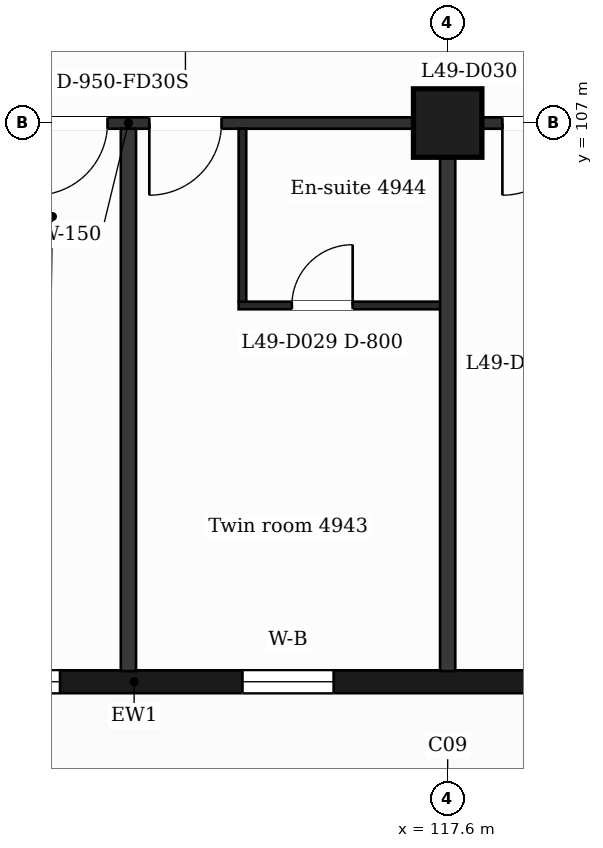
"""IFC4 building model, lengths in metres.
Left out: names, types, materials, properties, quantities, classifications, styles, units other than length and angle.
Written with IfcOpenShell. Run it as: python <this file> out.ifc"""

import sys

from ifc_helpers import new_model, si_unit, direction, frame, frame_2d, origin, origin_2d, place, context, subcontext, project, spatial, rectangle, extrude, element, fill, save


model = new_model("IFC4")
c1 = context("Model", 3, precision=1e-05, world=origin(), true_north=direction((0.0, 1.0)))
c2 = subcontext(c1, "Body", "Model", "MODEL_VIEW")
j1 = project(units=[si_unit("LENGTHUNIT", "METRE"), si_unit("PLANEANGLEUNIT", "RADIAN")], contexts=[c1])
p1 = place(None, origin())
s1 = spatial("IfcSite", under=j1, at=p1, CompositionType="ELEMENT")
p2 = place(p1, origin())
s2 = spatial("IfcBuilding", under=s1, at=p2, CompositionType="ELEMENT")
p3 = place(p2, frame((0.0, 0.0, 205.9)))
s3 = spatial("IfcBuildingStorey", under=s2, at=p3, CompositionType="ELEMENT", Elevation=205.9)
p4 = place(p3, frame((117.6, 107.0, 0.0), z_axis=(0.0, 0.0, 1.0), x_axis=(1.0, 0.0, 0.0)))
e1 = element("IfcColumn", 1, at=p4, inside=s3, PredefinedType="COLUMN", context=c2, shape_type="SweptSolid", body=[
    extrude(rectangle(XDim=0.9, YDim=0.9, at=origin_2d()), origin(), (0.0, 0.0, 1.0), 3.7),
])
p5 = place(p3, frame((89.85, 99.65, 0.0), z_axis=(0.0, 0.0, 1.0), x_axis=(1.0, 0.0, 0.0)))
e2 = element("IfcWall", 2, at=p5, inside=s3, PredefinedType="SOLIDWALL", context=c2, shape_type="SweptSolid", body=[
    extrude(rectangle(XDim=47.25, YDim=0.3, at=frame_2d((23.625, 0.0))), origin(), (0.0, 0.0, 1.0), 3.38),
])
p6 = place(p5, frame((0.725, 0.0, 0.9)))
e3 = element("IfcOpeningElement", 3, at=p6, cuts=e2, PredefinedType="OPENING", context=c2, shape_type="SweptSolid", body=[
    extrude(rectangle(XDim=1.2, YDim=2.1, at=frame_2d((0.6, 1.05))), frame((0.0, 0.16, 0.0), z_axis=(0.0, -1.0, 0.0), x_axis=(1.0, 0.0, 0.0)), (0.0, 0.0, 1.0), 0.32),
])
p7 = place(p5, frame((3.45, 0.0, 0.9)))
e4 = element("IfcOpeningElement", 4, at=p7, cuts=e2, PredefinedType="OPENING", context=c2, shape_type="SweptSolid", body=[
    extrude(rectangle(XDim=2.4, YDim=2.1, at=frame_2d((1.2, 1.05))), frame((0.0, 0.16, 0.0), z_axis=(0.0, -1.0, 0.0), x_axis=(1.0, 0.0, 0.0)), (0.0, 0.0, 1.0), 0.32),
])
p8 = place(p5, frame((7.65, 0.0, 0.9)))
e5 = element("IfcOpeningElement", 5, at=p8, cuts=e2, PredefinedType="OPENING", context=c2, shape_type="SweptSolid", body=[
    extrude(rectangle(XDim=2.4, YDim=2.1, at=frame_2d((1.2, 1.05))), frame((0.0, 0.16, 0.0), z_axis=(0.0, -1.0, 0.0), x_axis=(1.0, 0.0, 0.0)), (0.0, 0.0, 1.0), 0.32),
])
p9 = place(p5, frame((11.85, 0.0, 0.9)))
e6 = element("IfcOpeningElement", 6, at=p9, cuts=e2, PredefinedType="OPENING", context=c2, shape_type="SweptSolid", body=[
    extrude(rectangle(XDim=2.4, YDim=2.1, at=frame_2d((1.2, 1.05))), frame((0.0, 0.16, 0.0), z_axis=(0.0, -1.0, 0.0), x_axis=(1.0, 0.0, 0.0)), (0.0, 0.0, 1.0), 0.32),
])
p10 = place(p5, frame((16.05, 0.0, 0.9)))
e7 = element("IfcOpeningElement", 7, at=p10, cuts=e2, PredefinedType="OPENING", context=c2, shape_type="SweptSolid", body=[
    extrude(rectangle(XDim=2.4, YDim=2.1, at=frame_2d((1.2, 1.05))), frame((0.0, 0.16, 0.0), z_axis=(0.0, -1.0, 0.0), x_axis=(1.0, 0.0, 0.0)), (0.0, 0.0, 1.0), 0.32),
])
p11 = place(p5, frame((20.25, 0.0, 0.9)))
e8 = element("IfcOpeningElement", 8, at=p11, cuts=e2, PredefinedType="OPENING", context=c2, shape_type="SweptSolid", body=[
    extrude(rectangle(XDim=2.4, YDim=2.1, at=frame_2d((1.2, 1.05))), frame((0.0, 0.16, 0.0), z_axis=(0.0, -1.0, 0.0), x_axis=(1.0, 0.0, 0.0)), (0.0, 0.0, 1.0), 0.32),
])
p12 = place(p5, frame((25.05, 0.0, 0.9)))
e9 = element("IfcOpeningElement", 9, at=p12, cuts=e2, PredefinedType="OPENING", context=c2, shape_type="SweptSolid", body=[
    extrude(rectangle(XDim=1.2, YDim=2.1, at=frame_2d((0.6, 1.05))), frame((0.0, 0.16, 0.0), z_axis=(0.0, -1.0, 0.0), x_axis=(1.0, 0.0, 0.0)), (0.0, 0.0, 1.0), 0.32),
])
p13 = place(p5, frame((29.25, 0.0, 0.9)))
e10 = element("IfcOpeningElement", 10, at=p13, cuts=e2, PredefinedType="OPENING", context=c2, shape_type="SweptSolid", body=[
    extrude(rectangle(XDim=1.2, YDim=2.1, at=frame_2d((0.6, 1.05))), frame((0.0, 0.16, 0.0), z_axis=(0.0, -1.0, 0.0), x_axis=(1.0, 0.0, 0.0)), (0.0, 0.0, 1.0), 0.32),
])
p14 = place(p5, frame((32.55, 0.0, 0.0)))
e11 = element("IfcOpeningElement", 11, at=p14, cuts=e2, PredefinedType="OPENING", context=c2, shape_type="SweptSolid", body=[
    extrude(rectangle(XDim=1.2, YDim=2.4, at=frame_2d((0.6, 1.2))), frame((0.0, 0.16, 0.0), z_axis=(0.0, -1.0, 0.0), x_axis=(1.0, 0.0, 0.0)), (0.0, 0.0, 1.0), 0.32),
])
p15 = place(p5, frame((34.35, 0.0, 0.9)))
e12 = element("IfcOpeningElement", 12, at=p15, cuts=e2, PredefinedType="OPENING", context=c2, shape_type="SweptSolid", body=[
    extrude(rectangle(XDim=1.2, YDim=2.1, at=frame_2d((0.6, 1.05))), frame((0.0, 0.16, 0.0), z_axis=(0.0, -1.0, 0.0), x_axis=(1.0, 0.0, 0.0)), (0.0, 0.0, 1.0), 0.32),
])
p16 = place(p5, frame((37.05, 0.0, 0.9)))
e13 = element("IfcOpeningElement", 13, at=p16, cuts=e2, PredefinedType="OPENING", context=c2, shape_type="SweptSolid", body=[
    extrude(rectangle(XDim=2.4, YDim=2.1, at=frame_2d((1.2, 1.05))), frame((0.0, 0.16, 0.0), z_axis=(0.0, -1.0, 0.0), x_axis=(1.0, 0.0, 0.0)), (0.0, 0.0, 1.0), 0.32),
])
p17 = place(p5, frame((40.95, 0.0, 0.0)))
e14 = element("IfcOpeningElement", 14, at=p17, cuts=e2, PredefinedType="OPENING", context=c2, shape_type="SweptSolid", body=[
    extrude(rectangle(XDim=1.2, YDim=2.4, at=frame_2d((0.6, 1.2))), frame((0.0, 0.16, 0.0), z_axis=(0.0, -1.0, 0.0), x_axis=(1.0, 0.0, 0.0)), (0.0, 0.0, 1.0), 0.32),
])
p18 = place(p5, frame((42.75, 0.0, 0.9)))
e15 = element("IfcOpeningElement", 15, at=p18, cuts=e2, PredefinedType="OPENING", context=c2, shape_type="SweptSolid", body=[
    extrude(rectangle(XDim=1.2, YDim=2.1, at=frame_2d((0.6, 1.05))), frame((0.0, 0.16, 0.0), z_axis=(0.0, -1.0, 0.0), x_axis=(1.0, 0.0, 0.0)), (0.0, 0.0, 1.0), 0.32),
])
p19 = place(p5, frame((45.25, 0.0, 0.9)))
e16 = element("IfcOpeningElement", 16, at=p19, cuts=e2, PredefinedType="OPENING", context=c2, shape_type="SweptSolid", body=[
    extrude(rectangle(XDim=1.2, YDim=2.1, at=frame_2d((0.6, 1.05))), frame((0.0, 0.16, 0.0), z_axis=(0.0, -1.0, 0.0), x_axis=(1.0, 0.0, 0.0)), (0.0, 0.0, 1.0), 0.32),
])
p20 = place(p3, frame((114.85, 104.6, 0.0), z_axis=(0.0, 0.0, 1.0), x_axis=(1.0, 0.0, 0.0)))
e17 = element("IfcWall", 17, at=p20, inside=s3, PredefinedType="PARTITIONING", context=c2, shape_type="SweptSolid", body=[
    extrude(rectangle(XDim=2.75, YDim=0.1, at=frame_2d((1.375, 0.0))), origin(), (0.0, 0.0, 1.0), 3.38),
])
p21 = place(p20, frame((0.7, 0.0, 0.0)))
e18 = element("IfcOpeningElement", 18, at=p21, cuts=e17, PredefinedType="OPENING", context=c2, shape_type="SweptSolid", body=[
    extrude(rectangle(XDim=0.8, YDim=2.1, at=frame_2d((0.4, 1.05))), frame((0.0, 0.06, 0.0), z_axis=(0.0, -1.0, 0.0), x_axis=(1.0, 0.0, 0.0)), (0.0, 0.0, 1.0), 0.12),
])
p22 = place(p3, frame((87.018, 107.0, 0.0), z_axis=(0.0, 0.0, 1.0), x_axis=(1.0, 0.0, 0.0)))
e19 = element("IfcWall", 19, at=p22, inside=s3, PredefinedType="PARTITIONING", context=c2, shape_type="SweptSolid", body=[
    extrude(rectangle(XDim=52.765, YDim=0.15, at=frame_2d((26.382, 0.0))), origin(), (0.0, 0.0, 1.0), 3.38),
])
p23 = place(p22, frame((1.276, 0.0, 0.0)))
e20 = element("IfcOpeningElement", 20, at=p23, cuts=e19, PredefinedType="OPENING", context=c2, shape_type="SweptSolid", body=[
    extrude(rectangle(XDim=0.95, YDim=2.1, at=frame_2d((0.475, 1.05))), frame((0.0, 0.085, 0.0), z_axis=(0.0, -1.0, 0.0), x_axis=(1.0, 0.0, 0.0)), (0.0, 0.0, 1.0), 0.17),
])
p24 = place(p22, frame((6.369, 0.0, 0.0)))
e21 = element("IfcOpeningElement", 21, at=p24, cuts=e19, PredefinedType="OPENING", context=c2, shape_type="SweptSolid", body=[
    extrude(rectangle(XDim=0.95, YDim=2.1, at=frame_2d((0.475, 1.05))), frame((0.0, 0.085, 0.0), z_axis=(0.0, -1.0, 0.0), x_axis=(1.0, 0.0, 0.0)), (0.0, 0.0, 1.0), 0.17),
])
p25 = place(p22, frame((12.112, 0.0, 0.0)))
e22 = element("IfcOpeningElement", 22, at=p25, cuts=e19, PredefinedType="OPENING", context=c2, shape_type="SweptSolid", body=[
    extrude(rectangle(XDim=0.95, YDim=2.1, at=frame_2d((0.475, 1.05))), frame((0.0, 0.085, 0.0), z_axis=(0.0, -1.0, 0.0), x_axis=(1.0, 0.0, 0.0)), (0.0, 0.0, 1.0), 0.17),
])
p26 = place(p22, frame((14.582, 0.0, 0.0)))
e23 = element("IfcOpeningElement", 23, at=p26, cuts=e19, PredefinedType="OPENING", context=c2, shape_type="SweptSolid", body=[
    extrude(rectangle(XDim=0.95, YDim=2.1, at=frame_2d((0.475, 1.05))), frame((0.0, 0.085, 0.0), z_axis=(0.0, -1.0, 0.0), x_axis=(1.0, 0.0, 0.0)), (0.0, 0.0, 1.0), 0.17),
])
p27 = place(p22, frame((20.512, 0.0, 0.0)))
e24 = element("IfcOpeningElement", 24, at=p27, cuts=e19, PredefinedType="OPENING", context=c2, shape_type="SweptSolid", body=[
    extrude(rectangle(XDim=0.95, YDim=2.1, at=frame_2d((0.475, 1.05))), frame((0.0, 0.085, 0.0), z_axis=(0.0, -1.0, 0.0), x_axis=(1.0, 0.0, 0.0)), (0.0, 0.0, 1.0), 0.17),
])
p28 = place(p22, frame((25.157, 0.0, 0.0)))
e25 = element("IfcOpeningElement", 25, at=p28, cuts=e19, PredefinedType="OPENING", context=c2, shape_type="SweptSolid", body=[
    extrude(rectangle(XDim=0.95, YDim=2.1, at=frame_2d((0.475, 1.05))), frame((0.0, 0.085, 0.0), z_axis=(0.0, -1.0, 0.0), x_axis=(1.0, 0.0, 0.0)), (0.0, 0.0, 1.0), 0.17),
])
p29 = place(p22, frame((26.657, 0.0, 0.0)))
e26 = element("IfcOpeningElement", 26, at=p29, cuts=e19, PredefinedType="OPENING", context=c2, shape_type="SweptSolid", body=[
    extrude(rectangle(XDim=0.95, YDim=2.1, at=frame_2d((0.475, 1.05))), frame((0.0, 0.085, 0.0), z_axis=(0.0, -1.0, 0.0), x_axis=(1.0, 0.0, 0.0)), (0.0, 0.0, 1.0), 0.17),
])
p30 = place(p22, frame((31.302, 0.0, 0.0)))
e27 = element("IfcOpeningElement", 27, at=p30, cuts=e19, PredefinedType="OPENING", context=c2, shape_type="SweptSolid", body=[
    extrude(rectangle(XDim=0.95, YDim=2.1, at=frame_2d((0.475, 1.05))), frame((0.0, 0.085, 0.0), z_axis=(0.0, -1.0, 0.0), x_axis=(1.0, 0.0, 0.0)), (0.0, 0.0, 1.0), 0.17),
])
p31 = place(p22, frame((41.207, 0.0, 0.0)))
e28 = element("IfcOpeningElement", 28, at=p31, cuts=e19, PredefinedType="OPENING", context=c2, shape_type="SweptSolid", body=[
    extrude(rectangle(XDim=1.0, YDim=2.1, at=frame_2d((0.5, 1.05))), frame((0.0, 0.085, 0.0), z_axis=(0.0, -1.0, 0.0), x_axis=(1.0, 0.0, 0.0)), (0.0, 0.0, 1.0), 0.17),
])
p32 = place(p22, frame((43.907, 0.0, 0.0)))
e29 = element("IfcOpeningElement", 29, at=p32, cuts=e19, PredefinedType="OPENING", context=c2, shape_type="SweptSolid", body=[
    extrude(rectangle(XDim=0.95, YDim=2.1, at=frame_2d((0.475, 1.05))), frame((0.0, 0.085, 0.0), z_axis=(0.0, -1.0, 0.0), x_axis=(1.0, 0.0, 0.0)), (0.0, 0.0, 1.0), 0.17),
])
p33 = place(p22, frame((49.285, 0.0, 0.0)))
e30 = element("IfcOpeningElement", 30, at=p33, cuts=e19, PredefinedType="OPENING", context=c2, shape_type="SweptSolid", body=[
    extrude(rectangle(XDim=0.95, YDim=2.1, at=frame_2d((0.475, 1.05))), frame((0.0, 0.085, 0.0), z_axis=(0.0, -1.0, 0.0), x_axis=(1.0, 0.0, 0.0)), (0.0, 0.0, 1.0), 0.17),
])
p34 = place(p3, frame((113.4, 99.79, 0.0), z_axis=(0.0, 0.0, 1.0), x_axis=(0.0, 1.0, 0.0)))
e31 = element("IfcWall", 31, at=p34, inside=s3, PredefinedType="PARTITIONING", context=c2, shape_type="SweptSolid", body=[
    extrude(rectangle(XDim=7.135, YDim=0.2, at=frame_2d((3.567, 0.0))), origin(), (0.0, 0.0, 1.0), 3.38),
])
p35 = place(p3, frame((114.9, 104.65, 0.0), z_axis=(0.0, 0.0, 1.0), x_axis=(0.0, 1.0, 0.0)))
e32 = element("IfcWall", 32, at=p35, inside=s3, PredefinedType="PARTITIONING", context=c2, shape_type="SweptSolid", body=[
    extrude(rectangle(XDim=2.275, YDim=0.1, at=frame_2d((1.138, 0.0))), origin(), (0.0, 0.0, 1.0), 3.38),
])
p36 = place(p3, frame((117.6, 99.79, 0.0), z_axis=(0.0, 0.0, 1.0), x_axis=(0.0, 1.0, 0.0)))
e33 = element("IfcWall", 33, at=p36, inside=s3, PredefinedType="PARTITIONING", context=c2, shape_type="SweptSolid", body=[
    extrude(rectangle(XDim=7.135, YDim=0.2, at=frame_2d((3.567, 0.0))), origin(), (0.0, 0.0, 1.0), 3.38),
])
p37 = place(p11, origin())
e34 = element("IfcWindow", 34, at=p37, inside=s3, PartitioningType="SINGLE_PANEL", PredefinedType="WINDOW", context=c2, shape_type="SweptSolid", body=[
    extrude(rectangle(XDim=2.4, YDim=2.1, at=frame_2d((1.2, 1.05))), frame((0.0, 0.03, 0.0), z_axis=(0.0, -1.0, 0.0), x_axis=(1.0, 0.0, 0.0)), (0.0, 0.0, 1.0), 0.06),
])
fill(e8, e34)
p38 = place(p12, origin())
e35 = element("IfcWindow", 35, at=p38, inside=s3, PartitioningType="SINGLE_PANEL", PredefinedType="WINDOW", context=c2, shape_type="SweptSolid", body=[
    extrude(rectangle(XDim=1.2, YDim=2.1, at=frame_2d((0.6, 1.05))), frame((0.0, 0.03, 0.0), z_axis=(0.0, -1.0, 0.0), x_axis=(1.0, 0.0, 0.0)), (0.0, 0.0, 1.0), 0.06),
])
fill(e9, e35)
p39 = place(p28, origin())
e36 = element("IfcDoor", 36, at=p39, inside=s3, OperationType="SINGLE_SWING_LEFT", PredefinedType="DOOR", context=c2, shape_type="SweptSolid", body=[
    extrude(rectangle(XDim=0.95, YDim=2.1, at=frame_2d((0.475, 1.05))), frame((0.0, 0.025, 0.0), z_axis=(0.0, -1.0, 0.0), x_axis=(1.0, 0.0, 0.0)), (0.0, 0.0, 1.0), 0.05),
])
fill(e25, e36)
p40 = place(p29, origin())
e37 = element("IfcDoor", 37, at=p40, inside=s3, OperationType="SINGLE_SWING_LEFT", PredefinedType="DOOR", context=c2, shape_type="SweptSolid", body=[
    extrude(rectangle(XDim=0.95, YDim=2.1, at=frame_2d((0.475, 1.05))), frame((0.0, 0.025, 0.0), z_axis=(0.0, -1.0, 0.0), x_axis=(1.0, 0.0, 0.0)), (0.0, 0.0, 1.0), 0.05),
])
fill(e26, e37)
p41 = place(p21, origin())
e38 = element("IfcDoor", 38, at=p41, inside=s3, OperationType="SINGLE_SWING_RIGHT", PredefinedType="DOOR", context=c2, shape_type="SweptSolid", body=[
    extrude(rectangle(XDim=0.8, YDim=2.1, at=frame_2d((0.4, 1.05))), frame((0.0, 0.025, 0.0), z_axis=(0.0, -1.0, 0.0), x_axis=(1.0, 0.0, 0.0)), (0.0, 0.0, 1.0), 0.05),
])
fill(e18, e38)
p42 = place(p30, origin())
e39 = element("IfcDoor", 39, at=p42, inside=s3, OperationType="SINGLE_SWING_LEFT", PredefinedType="DOOR", context=c2, shape_type="SweptSolid", body=[
    extrude(rectangle(XDim=0.95, YDim=2.1, at=frame_2d((0.475, 1.05))), frame((0.0, 0.025, 0.0), z_axis=(0.0, -1.0, 0.0), x_axis=(1.0, 0.0, 0.0)), (0.0, 0.0, 1.0), 0.05),
])
fill(e27, e39)
save(model, sys.argv[1])
